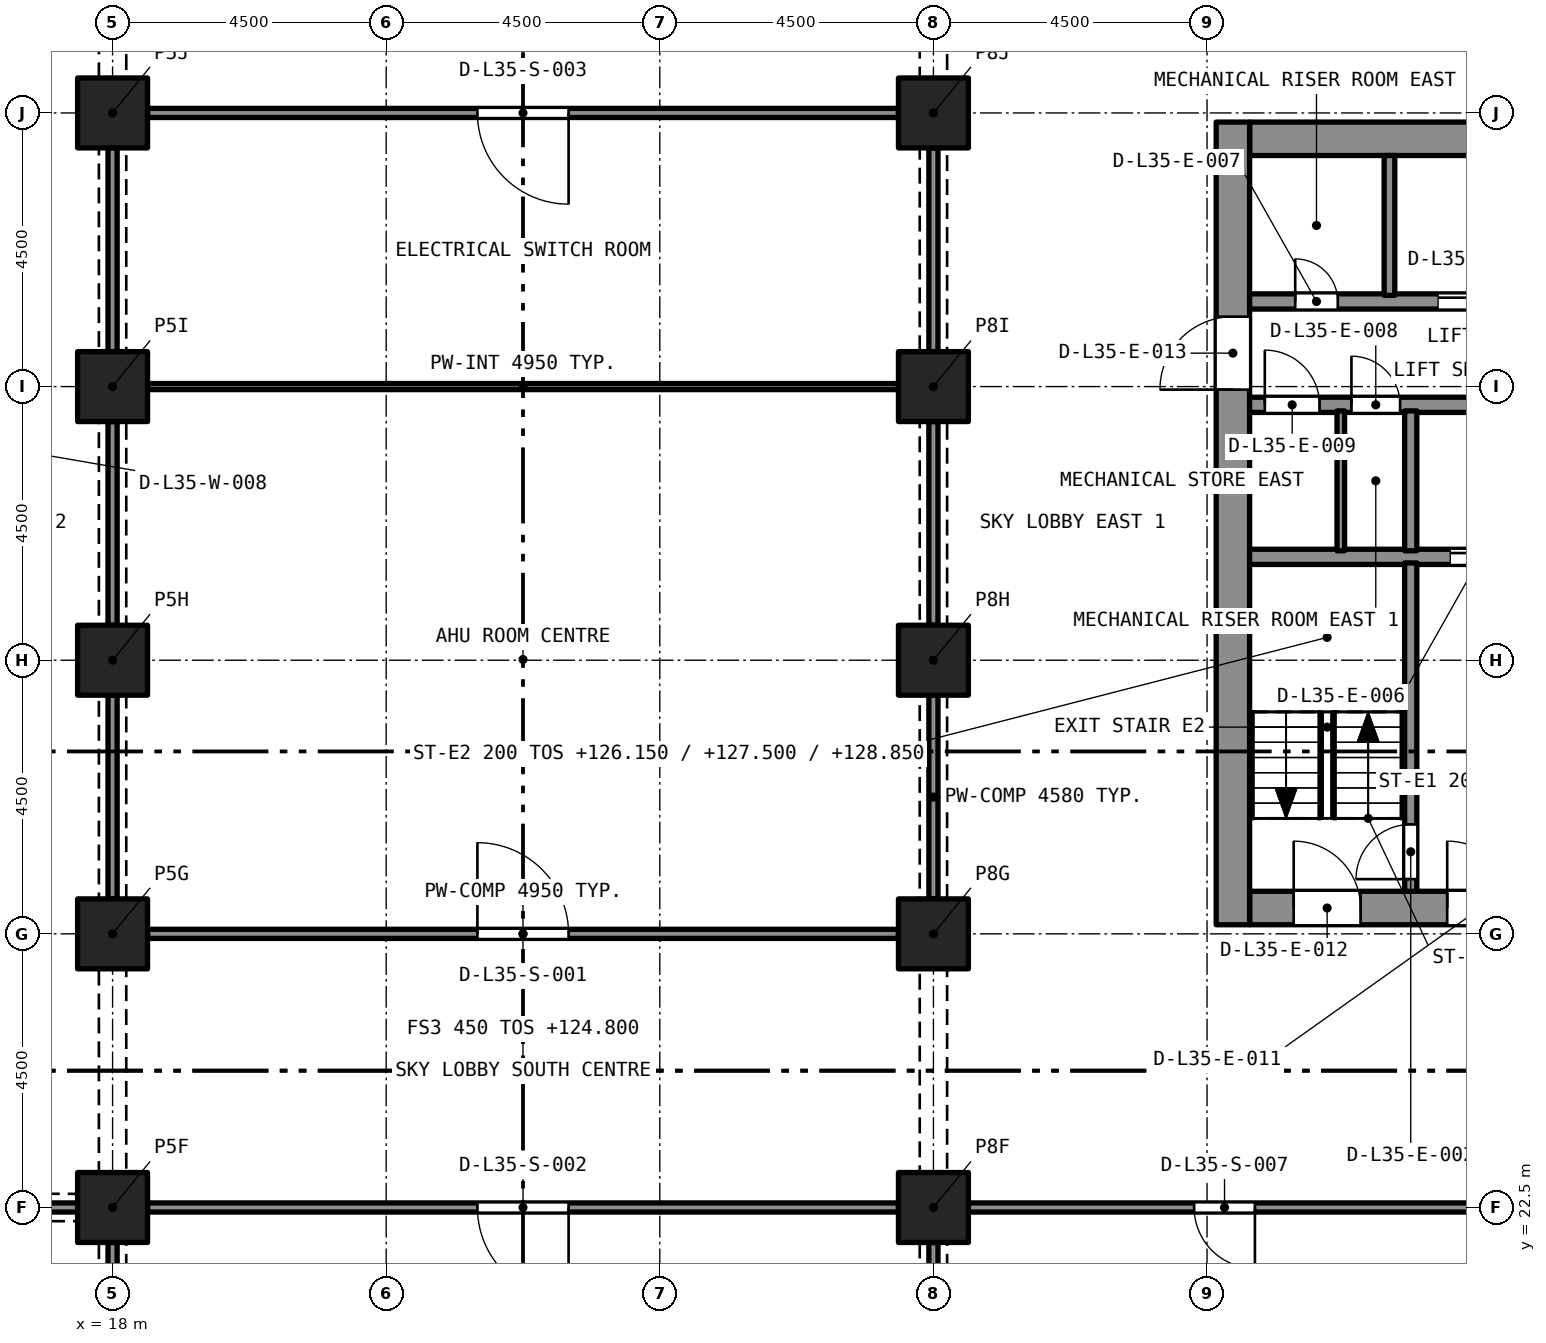
"""IFC4 building model, lengths in metres.
Left out: names, types, materials, properties, quantities, classifications, styles, units other than length and angle.
Written with IfcOpenShell. Run it as: python <this file> out.ifc"""

import sys

from ifc_helpers import new_model, si_unit, direction, frame, frame_2d, origin, origin_2d, place, context, subcontext, project, spatial, rectangle, extrude, element, fill, save


model = new_model("IFC4")
c1 = context("Model", 3, precision=1e-05, world=origin(), true_north=direction((0.0, 1.0)))
c2 = subcontext(c1, "Body", "Model", "MODEL_VIEW")
j1 = project(units=[si_unit("LENGTHUNIT", "METRE"), si_unit("PLANEANGLEUNIT", "RADIAN")], contexts=[c1])
p1 = place(None, origin())
s1 = spatial("IfcSite", under=j1, at=p1, CompositionType="ELEMENT")
p2 = place(p1, origin())
s2 = spatial("IfcBuilding", under=s1, at=p2, CompositionType="ELEMENT")
p3 = place(p2, frame((0.0, 0.0, 124.8)))
s3 = spatial("IfcBuildingStorey", under=s2, at=p3, CompositionType="ELEMENT", Elevation=124.8)
for number, where, z_axis, x_axis in (
    (1, (18.0, 22.5, 0.0), (0.0, 0.0, 1.0), (1.0, 0.0, 0.0)),
    (2, (31.5, 22.5, 0.0), (0.0, 0.0, 1.0), (1.0, 0.0, 0.0)),
    (3, (18.0, 27.0, 0.0), (0.0, 0.0, 1.0), (1.0, 0.0, 0.0)),
    (4, (31.5, 27.0, 0.0), (0.0, 0.0, 1.0), (1.0, 0.0, 0.0)),
    (5, (18.0, 31.5, 0.0), (0.0, 0.0, 1.0), (1.0, 0.0, 0.0)),
    (6, (31.5, 31.5, 0.0), (0.0, 0.0, 1.0), (1.0, 0.0, 0.0)),
    (7, (18.0, 36.0, 0.0), (0.0, 0.0, 1.0), (1.0, 0.0, 0.0)),
    (8, (31.5, 36.0, 0.0), (0.0, 0.0, 1.0), (1.0, 0.0, 0.0)),
    (9, (18.0, 40.5, 0.0), (0.0, 0.0, 1.0), (1.0, 0.0, 0.0)),
    (10, (31.5, 40.5, 0.0), (0.0, 0.0, 1.0), (1.0, 0.0, 0.0)),
):
    element("IfcColumn", number, at=place(p3, frame(where, z_axis=z_axis, x_axis=x_axis)), inside=s3, PredefinedType="COLUMN", context=c2, shape_type="SweptSolid", body=[
        extrude(rectangle(XDim=1.15, YDim=1.15, at=origin_2d()), origin(), (0.0, 0.0, 1.0), 5.4),
    ])
p4 = place(p3, frame((36.7, 27.425, 0.0), z_axis=(0.0, 0.0, 1.0), x_axis=(1.0, 0.0, 0.0)))
e11 = element("IfcWall", 11, at=p4, inside=s3, PredefinedType="SOLIDWALL", context=c2, shape_type="SweptSolid", body=[
    extrude(rectangle(XDim=7.6, YDim=0.55, at=frame_2d((3.8, 0.0))), origin(), (0.0, 0.0, 1.0), 5.4),
])
p5 = place(p4, frame((5.775, 0.0, 0.0)))
e12 = element("IfcOpeningElement", 12, at=p5, cuts=e11, PredefinedType="OPENING", context=c2, shape_type="SweptSolid", body=[
    extrude(rectangle(XDim=1.1, YDim=2.1, at=frame_2d((0.55, 1.05))), frame((0.0, 0.285, 0.0), z_axis=(0.0, -1.0, 0.0), x_axis=(1.0, 0.0, 0.0)), (0.0, 0.0, 1.0), 0.57),
])
p6 = place(p4, frame((3.25, 0.0, 0.0)))
e13 = element("IfcOpeningElement", 13, at=p6, cuts=e11, PredefinedType="OPENING", context=c2, shape_type="SweptSolid", body=[
    extrude(rectangle(XDim=1.1, YDim=2.1, at=frame_2d((0.55, 1.05))), frame((0.0, 0.285, 0.0), z_axis=(0.0, -1.0, 0.0), x_axis=(1.0, 0.0, 0.0)), (0.0, 0.0, 1.0), 0.57),
])
p7 = place(p4, frame((0.725, 0.0, 0.0)))
e14 = element("IfcOpeningElement", 14, at=p7, cuts=e11, PredefinedType="OPENING", context=c2, shape_type="SweptSolid", body=[
    extrude(rectangle(XDim=1.1, YDim=2.1, at=frame_2d((0.55, 1.05))), frame((0.0, 0.285, 0.0), z_axis=(0.0, -1.0, 0.0), x_axis=(1.0, 0.0, 0.0)), (0.0, 0.0, 1.0), 0.57),
])
p8 = place(p3, frame((36.7, 40.075, 0.0), z_axis=(0.0, 0.0, 1.0), x_axis=(1.0, 0.0, 0.0)))
e15 = element("IfcWall", 15, at=p8, inside=s3, PredefinedType="SOLIDWALL", context=c2, shape_type="SweptSolid", body=[
    extrude(rectangle(XDim=7.6, YDim=0.55, at=frame_2d((3.8, 0.0))), origin(), (0.0, 0.0, 1.0), 5.4),
])
p9 = place(p3, frame((36.425, 27.15, 0.0), z_axis=(0.0, 0.0, 1.0), x_axis=(0.0, 1.0, 0.0)))
e16 = element("IfcWall", 16, at=p9, inside=s3, PredefinedType="SOLIDWALL", context=c2, shape_type="SweptSolid", body=[
    extrude(rectangle(XDim=13.2, YDim=0.55, at=frame_2d((6.6, 0.0))), origin(), (0.0, 0.0, 1.0), 5.4),
])
p10 = place(p9, frame((8.8, 0.0, 0.0)))
e17 = element("IfcOpeningElement", 17, at=p10, cuts=e16, PredefinedType="OPENING", context=c2, shape_type="SweptSolid", body=[
    extrude(rectangle(XDim=1.2, YDim=2.1, at=frame_2d((0.6, 1.05))), frame((0.0, 0.285, 0.0), z_axis=(0.0, -1.0, 0.0), x_axis=(1.0, 0.0, 0.0)), (0.0, 0.0, 1.0), 0.57),
])
p11 = place(p3, frame((36.7, 33.2, 0.0), z_axis=(0.0, 0.0, 1.0), x_axis=(1.0, 0.0, 0.0)))
e18 = element("IfcWall", 18, at=p11, inside=s3, PredefinedType="SOLIDWALL", context=c2, shape_type="SweptSolid", body=[
    extrude(rectangle(XDim=7.6, YDim=0.25, at=frame_2d((3.8, 0.0))), origin(), (0.0, 0.0, 1.0), 5.1),
])
p12 = place(p11, frame((3.3, 0.0, 0.0)))
e19 = element("IfcOpeningElement", 19, at=p12, cuts=e18, PredefinedType="OPENING", context=c2, shape_type="SweptSolid", body=[
    extrude(rectangle(XDim=1.0, YDim=2.1, at=frame_2d((0.5, 1.05))), frame((0.0, 0.135, 0.0), z_axis=(0.0, -1.0, 0.0), x_axis=(1.0, 0.0, 0.0)), (0.0, 0.0, 1.0), 0.27),
])
p13 = place(p3, frame((36.7, 35.7, 0.0), z_axis=(0.0, 0.0, 1.0), x_axis=(1.0, 0.0, 0.0)))
e20 = element("IfcWall", 20, at=p13, inside=s3, PredefinedType="SOLIDWALL", context=c2, shape_type="SweptSolid", body=[
    extrude(rectangle(XDim=7.6, YDim=0.25, at=frame_2d((3.8, 0.0))), origin(), (0.0, 0.0, 1.0), 5.1),
])
p14 = place(p13, frame((5.775, 0.0, 0.0)))
e21 = element("IfcOpeningElement", 21, at=p14, cuts=e20, PredefinedType="OPENING", context=c2, shape_type="SweptSolid", body=[
    extrude(rectangle(XDim=1.1, YDim=2.4, at=frame_2d((0.55, 1.2))), frame((0.0, 0.135, 0.0), z_axis=(0.0, -1.0, 0.0), x_axis=(1.0, 0.0, 0.0)), (0.0, 0.0, 1.0), 0.27),
])
p15 = place(p13, frame((1.675, 0.0, 0.0)))
e22 = element("IfcOpeningElement", 22, at=p15, cuts=e20, PredefinedType="OPENING", context=c2, shape_type="SweptSolid", body=[
    extrude(rectangle(XDim=0.8, YDim=2.1, at=frame_2d((0.4, 1.05))), frame((0.0, 0.135, 0.0), z_axis=(0.0, -1.0, 0.0), x_axis=(1.0, 0.0, 0.0)), (0.0, 0.0, 1.0), 0.27),
])
p16 = place(p13, frame((0.25, 0.0, 0.0)))
e23 = element("IfcOpeningElement", 23, at=p16, cuts=e20, PredefinedType="OPENING", context=c2, shape_type="SweptSolid", body=[
    extrude(rectangle(XDim=0.9, YDim=2.1, at=frame_2d((0.45, 1.05))), frame((0.0, 0.135, 0.0), z_axis=(0.0, -1.0, 0.0), x_axis=(1.0, 0.0, 0.0)), (0.0, 0.0, 1.0), 0.27),
])
p17 = place(p3, frame((36.7, 37.4, 0.0), z_axis=(0.0, 0.0, 1.0), x_axis=(1.0, 0.0, 0.0)))
e24 = element("IfcWall", 24, at=p17, inside=s3, PredefinedType="SOLIDWALL", context=c2, shape_type="SweptSolid", body=[
    extrude(rectangle(XDim=7.6, YDim=0.25, at=frame_2d((3.8, 0.0))), origin(), (0.0, 0.0, 1.0), 5.1),
])
p18 = place(p17, frame((5.8, 0.0, 0.0)))
e25 = element("IfcOpeningElement", 25, at=p18, cuts=e24, PredefinedType="OPENING", context=c2, shape_type="SweptSolid", body=[
    extrude(rectangle(XDim=1.1, YDim=2.4, at=frame_2d((0.55, 1.2))), frame((0.0, 0.135, 0.0), z_axis=(0.0, -1.0, 0.0), x_axis=(1.0, 0.0, 0.0)), (0.0, 0.0, 1.0), 0.27),
])
p19 = place(p17, frame((3.1, 0.0, 0.0)))
e26 = element("IfcOpeningElement", 26, at=p19, cuts=e24, PredefinedType="OPENING", context=c2, shape_type="SweptSolid", body=[
    extrude(rectangle(XDim=1.1, YDim=2.4, at=frame_2d((0.55, 1.2))), frame((0.0, 0.135, 0.0), z_axis=(0.0, -1.0, 0.0), x_axis=(1.0, 0.0, 0.0)), (0.0, 0.0, 1.0), 0.27),
])
p20 = place(p17, frame((0.75, 0.0, 0.0)))
e27 = element("IfcOpeningElement", 27, at=p20, cuts=e24, PredefinedType="OPENING", context=c2, shape_type="SweptSolid", body=[
    extrude(rectangle(XDim=0.7, YDim=2.1, at=frame_2d((0.35, 1.05))), frame((0.0, 0.135, 0.0), z_axis=(0.0, -1.0, 0.0), x_axis=(1.0, 0.0, 0.0)), (0.0, 0.0, 1.0), 0.27),
])
p21 = place(p3, frame((39.35, 27.7, 0.0), z_axis=(0.0, 0.0, 1.0), x_axis=(0.0, 1.0, 0.0)))
e28 = element("IfcWall", 28, at=p21, inside=s3, PredefinedType="SOLIDWALL", context=c2, shape_type="SweptSolid", body=[
    extrude(rectangle(XDim=5.4, YDim=0.2, at=frame_2d((2.7, 0.0))), origin(), (0.0, 0.0, 1.0), 5.1),
])
p22 = place(p21, frame((0.2, 0.0, 0.0)))
e29 = element("IfcOpeningElement", 29, at=p22, cuts=e28, PredefinedType="OPENING", context=c2, shape_type="SweptSolid", body=[
    extrude(rectangle(XDim=0.9, YDim=2.1, at=frame_2d((0.45, 1.05))), frame((0.0, 0.11, 0.0), z_axis=(0.0, -1.0, 0.0), x_axis=(1.0, 0.0, 0.0)), (0.0, 0.0, 1.0), 0.22),
])
p23 = place(p3, frame((39.35, 33.3, 0.0), z_axis=(0.0, 0.0, 1.0), x_axis=(0.0, 1.0, 0.0)))
e30 = element("IfcWall", 30, at=p23, inside=s3, PredefinedType="SOLIDWALL", context=c2, shape_type="SweptSolid", body=[
    extrude(rectangle(XDim=2.3, YDim=0.2, at=frame_2d((1.15, 0.0))), origin(), (0.0, 0.0, 1.0), 5.1),
])
p24 = place(p3, frame((39.0, 37.5, 0.0), z_axis=(0.0, 0.0, 1.0), x_axis=(0.0, 1.0, 0.0)))
e31 = element("IfcWall", 31, at=p24, inside=s3, PredefinedType="SOLIDWALL", context=c2, shape_type="SweptSolid", body=[
    extrude(rectangle(XDim=2.3, YDim=0.175, at=frame_2d((1.15, 0.0))), origin(), (0.0, 0.0, 1.0), 5.1),
])
p25 = place(p3, frame((38.2, 33.3, 0.0), z_axis=(0.0, 0.0, 1.0), x_axis=(0.0, 1.0, 0.0)))
e32 = element("IfcWall", 32, at=p25, inside=s3, PredefinedType="PARTITIONING", context=c2, shape_type="SweptSolid", body=[
    extrude(rectangle(XDim=2.3, YDim=0.125, at=frame_2d((1.15, 0.0))), origin(), (0.0, 0.0, 1.0), 5.1),
])
p26 = place(p3, frame((18.575, 27.0, 0.0), z_axis=(0.0, 0.0, 1.0), x_axis=(1.0, 0.0, 0.0)))
e33 = element("IfcWall", 33, at=p26, inside=s3, PredefinedType="PARTITIONING", context=c2, shape_type="SweptSolid", body=[
    extrude(rectangle(XDim=12.35, YDim=0.15, at=frame_2d((6.175, 0.0))), origin(), (0.0, 0.0, 1.0), 4.95),
])
p27 = place(p26, frame((5.425, 0.0, 0.0)))
e34 = element("IfcOpeningElement", 34, at=p27, cuts=e33, PredefinedType="OPENING", context=c2, shape_type="SweptSolid", body=[
    extrude(rectangle(XDim=1.5, YDim=2.4, at=frame_2d((0.75, 1.2))), frame((0.0, 0.085, 0.0), z_axis=(0.0, -1.0, 0.0), x_axis=(1.0, 0.0, 0.0)), (0.0, 0.0, 1.0), 0.17),
])
p28 = place(p3, frame((30.925, 22.5, 0.0), z_axis=(0.0, 0.0, 1.0), x_axis=(-1.0, 0.0, 0.0)))
e35 = element("IfcWall", 35, at=p28, inside=s3, PredefinedType="PARTITIONING", context=c2, shape_type="SweptSolid", body=[
    extrude(rectangle(XDim=12.35, YDim=0.15, at=frame_2d((6.175, 0.0))), origin(), (0.0, 0.0, 1.0), 4.95),
])
p29 = place(p28, frame((5.425, 0.0, 0.0)))
e36 = element("IfcOpeningElement", 36, at=p29, cuts=e35, PredefinedType="OPENING", context=c2, shape_type="SweptSolid", body=[
    extrude(rectangle(XDim=1.5, YDim=2.4, at=frame_2d((0.75, 1.2))), frame((0.0, 0.085, 0.0), z_axis=(0.0, -1.0, 0.0), x_axis=(1.0, 0.0, 0.0)), (0.0, 0.0, 1.0), 0.17),
])
p30 = place(p3, frame((18.575, 36.0, 0.0), z_axis=(0.0, 0.0, 1.0), x_axis=(1.0, 0.0, 0.0)))
e37 = element("IfcWall", 37, at=p30, inside=s3, PredefinedType="PARTITIONING", context=c2, shape_type="SweptSolid", body=[
    extrude(rectangle(XDim=12.35, YDim=0.1, at=frame_2d((6.175, 0.0))), origin(), (0.0, 0.0, 1.0), 4.95),
])
for number, where, z_axis, x_axis in (
    (38, (31.5, 32.075, 0.0), (0.0, 0.0, 1.0), (0.0, 1.0, 0.0)),
    (39, (31.5, 27.575, 0.0), (0.0, 0.0, 1.0), (0.0, 1.0, 0.0)),
    (40, (18.0, 27.575, 0.0), (0.0, 0.0, 1.0), (0.0, 1.0, 0.0)),
    (41, (18.0, 32.075, 0.0), (0.0, 0.0, 1.0), (0.0, 1.0, 0.0)),
):
    element("IfcWall", number, at=place(p3, frame(where, z_axis=z_axis, x_axis=x_axis)), inside=s3, PredefinedType="PARTITIONING", context=c2, shape_type="SweptSolid", body=[
        extrude(rectangle(XDim=3.35, YDim=0.15, at=frame_2d((1.675, 0.0))), origin(), (0.0, 0.0, 1.0), 4.58),
    ])
p31 = place(p3, frame((30.925, 40.5, 0.0), z_axis=(0.0, 0.0, 1.0), x_axis=(-1.0, 0.0, 0.0)))
e42 = element("IfcWall", 42, at=p31, inside=s3, PredefinedType="PARTITIONING", context=c2, shape_type="SweptSolid", body=[
    extrude(rectangle(XDim=12.35, YDim=0.15, at=frame_2d((6.175, 0.0))), origin(), (0.0, 0.0, 1.0), 4.95),
])
p32 = place(p31, frame((5.425, 0.0, 0.0)))
e43 = element("IfcOpeningElement", 43, at=p32, cuts=e42, PredefinedType="OPENING", context=c2, shape_type="SweptSolid", body=[
    extrude(rectangle(XDim=1.5, YDim=2.4, at=frame_2d((0.75, 1.2))), frame((0.0, 0.085, 0.0), z_axis=(0.0, -1.0, 0.0), x_axis=(1.0, 0.0, 0.0)), (0.0, 0.0, 1.0), 0.17),
])
for number, where, z_axis, x_axis in (
    (44, (31.5, 36.575, 0.0), (0.0, 0.0, 1.0), (0.0, 1.0, 0.0)),
    (45, (18.0, 36.575, 0.0), (0.0, 0.0, 1.0), (0.0, 1.0, 0.0)),
    (46, (31.5, 18.575, 0.0), (0.0, 0.0, 1.0), (0.0, 1.0, 0.0)),
    (47, (18.0, 18.575, 0.0), (0.0, 0.0, 1.0), (0.0, 1.0, 0.0)),
):
    element("IfcWall", number, at=place(p3, frame(where, z_axis=z_axis, x_axis=x_axis)), inside=s3, PredefinedType="PARTITIONING", context=c2, shape_type="SweptSolid", body=[
        extrude(rectangle(XDim=3.35, YDim=0.15, at=frame_2d((1.675, 0.0))), origin(), (0.0, 0.0, 1.0), 4.58),
    ])
p33 = place(p3, frame((40.575, 22.5, 0.0), z_axis=(0.0, 0.0, 1.0), x_axis=(-1.0, 0.0, 0.0)))
e48 = element("IfcWall", 48, at=p33, inside=s3, PredefinedType="PARTITIONING", context=c2, shape_type="SweptSolid", body=[
    extrude(rectangle(XDim=8.5, YDim=0.15, at=frame_2d((4.25, 0.0))), origin(), (0.0, 0.0, 1.0), 5.1),
])
p34 = place(p33, frame((3.788, 0.0, 0.0)))
e49 = element("IfcOpeningElement", 49, at=p34, cuts=e48, PredefinedType="OPENING", context=c2, shape_type="SweptSolid", body=[
    extrude(rectangle(XDim=1.0, YDim=2.1, at=frame_2d((0.5, 1.05))), frame((0.0, 0.085, 0.0), z_axis=(0.0, -1.0, 0.0), x_axis=(1.0, 0.0, 0.0)), (0.0, 0.0, 1.0), 0.17),
])
p35 = place(p3, frame((17.425, 22.5, 0.0), z_axis=(0.0, 0.0, 1.0), x_axis=(-1.0, 0.0, 0.0)))
e50 = element("IfcWall", 50, at=p35, inside=s3, PredefinedType="PARTITIONING", context=c2, shape_type="SweptSolid", body=[
    extrude(rectangle(XDim=3.35, YDim=0.15, at=frame_2d((1.675, 0.0))), origin(), (0.0, 0.0, 1.0), 4.58),
])
p36 = place(p35, frame((1.175, 0.0, 0.0)))
e51 = element("IfcOpeningElement", 51, at=p36, cuts=e50, PredefinedType="OPENING", context=c2, shape_type="SweptSolid", body=[
    extrude(rectangle(XDim=1.0, YDim=2.1, at=frame_2d((0.5, 1.05))), frame((0.0, 0.085, 0.0), z_axis=(0.0, -1.0, 0.0), x_axis=(1.0, 0.0, 0.0)), (0.0, 0.0, 1.0), 0.17),
])
p37 = place(p22, origin())
e52 = element("IfcDoor", 52, at=p37, inside=s3, OperationType="SINGLE_SWING_LEFT", PredefinedType="DOOR", context=c2, shape_type="SweptSolid", body=[
    extrude(rectangle(XDim=0.9, YDim=2.1, at=frame_2d((0.45, 1.05))), frame((0.0, 0.025, 0.0), z_axis=(0.0, -1.0, 0.0), x_axis=(1.0, 0.0, 0.0)), (0.0, 0.0, 1.0), 0.05),
])
fill(e29, e52)
p38 = place(p19, origin())
e53 = element("IfcDoor", 53, at=p38, inside=s3, OperationType="SLIDING_TO_LEFT", PredefinedType="DOOR", context=c2, shape_type="SweptSolid", body=[
    extrude(rectangle(XDim=1.1, YDim=2.4, at=frame_2d((0.55, 1.2))), frame((0.0, 0.025, 0.0), z_axis=(0.0, -1.0, 0.0), x_axis=(1.0, 0.0, 0.0)), (0.0, 0.0, 1.0), 0.05),
])
fill(e26, e53)
p39 = place(p12, origin())
e54 = element("IfcDoor", 54, at=p39, inside=s3, OperationType="SLIDING_TO_LEFT", PredefinedType="DOOR", context=c2, shape_type="SweptSolid", body=[
    extrude(rectangle(XDim=1.0, YDim=2.1, at=frame_2d((0.5, 1.05))), frame((0.0, 0.025, 0.0), z_axis=(0.0, -1.0, 0.0), x_axis=(1.0, 0.0, 0.0)), (0.0, 0.0, 1.0), 0.05),
])
fill(e19, e54)
p40 = place(p20, origin())
e55 = element("IfcDoor", 55, at=p40, inside=s3, OperationType="SINGLE_SWING_LEFT", PredefinedType="DOOR", context=c2, shape_type="SweptSolid", body=[
    extrude(rectangle(XDim=0.7, YDim=2.1, at=frame_2d((0.35, 1.05))), frame((0.0, 0.025, 0.0), z_axis=(0.0, -1.0, 0.0), x_axis=(1.0, 0.0, 0.0)), (0.0, 0.0, 1.0), 0.05),
])
fill(e27, e55)
p41 = place(p15, origin())
e56 = element("IfcDoor", 56, at=p41, inside=s3, OperationType="SINGLE_SWING_LEFT", PredefinedType="DOOR", context=c2, shape_type="SweptSolid", body=[
    extrude(rectangle(XDim=0.8, YDim=2.1, at=frame_2d((0.4, 1.05))), frame((0.0, 0.025, 0.0), z_axis=(0.0, -1.0, 0.0), x_axis=(1.0, 0.0, 0.0)), (0.0, 0.0, 1.0), 0.05),
])
fill(e22, e56)
p42 = place(p16, origin())
e57 = element("IfcDoor", 57, at=p42, inside=s3, OperationType="SINGLE_SWING_LEFT", PredefinedType="DOOR", context=c2, shape_type="SweptSolid", body=[
    extrude(rectangle(XDim=0.9, YDim=2.1, at=frame_2d((0.45, 1.05))), frame((0.0, 0.025, 0.0), z_axis=(0.0, -1.0, 0.0), x_axis=(1.0, 0.0, 0.0)), (0.0, 0.0, 1.0), 0.05),
])
fill(e23, e57)
p43 = place(p6, origin())
e58 = element("IfcDoor", 58, at=p43, inside=s3, OperationType="SINGLE_SWING_LEFT", PredefinedType="DOOR", context=c2, shape_type="SweptSolid", body=[
    extrude(rectangle(XDim=1.1, YDim=2.1, at=frame_2d((0.55, 1.05))), frame((0.0, 0.025, 0.0), z_axis=(0.0, -1.0, 0.0), x_axis=(1.0, 0.0, 0.0)), (0.0, 0.0, 1.0), 0.05),
])
fill(e13, e58)
p44 = place(p7, origin())
e59 = element("IfcDoor", 59, at=p44, inside=s3, OperationType="SINGLE_SWING_LEFT", PredefinedType="DOOR", context=c2, shape_type="SweptSolid", body=[
    extrude(rectangle(XDim=1.1, YDim=2.1, at=frame_2d((0.55, 1.05))), frame((0.0, 0.025, 0.0), z_axis=(0.0, -1.0, 0.0), x_axis=(1.0, 0.0, 0.0)), (0.0, 0.0, 1.0), 0.05),
])
fill(e14, e59)
p45 = place(p10, origin())
e60 = element("IfcDoor", 60, at=p45, inside=s3, OperationType="SINGLE_SWING_LEFT", PredefinedType="DOOR", context=c2, shape_type="SweptSolid", body=[
    extrude(rectangle(XDim=1.2, YDim=2.1, at=frame_2d((0.6, 1.05))), frame((0.0, 0.025, 0.0), z_axis=(0.0, -1.0, 0.0), x_axis=(1.0, 0.0, 0.0)), (0.0, 0.0, 1.0), 0.05),
])
fill(e17, e60)
p46 = place(p27, origin())
e61 = element("IfcDoor", 61, at=p46, inside=s3, OperationType="DOUBLE_DOOR_SINGLE_SWING", PredefinedType="DOOR", context=c2, shape_type="SweptSolid", body=[
    extrude(rectangle(XDim=1.5, YDim=2.4, at=frame_2d((0.75, 1.2))), frame((0.0, 0.025, 0.0), z_axis=(0.0, -1.0, 0.0), x_axis=(1.0, 0.0, 0.0)), (0.0, 0.0, 1.0), 0.05),
])
fill(e34, e61)
p47 = place(p29, origin())
e62 = element("IfcDoor", 62, at=p47, inside=s3, OperationType="DOUBLE_DOOR_SINGLE_SWING", PredefinedType="DOOR", context=c2, shape_type="SweptSolid", body=[
    extrude(rectangle(XDim=1.5, YDim=2.4, at=frame_2d((0.75, 1.2))), frame((0.0, 0.025, 0.0), z_axis=(0.0, -1.0, 0.0), x_axis=(1.0, 0.0, 0.0)), (0.0, 0.0, 1.0), 0.05),
])
fill(e36, e62)
p48 = place(p32, origin())
e63 = element("IfcDoor", 63, at=p48, inside=s3, OperationType="DOUBLE_DOOR_SINGLE_SWING", PredefinedType="DOOR", context=c2, shape_type="SweptSolid", body=[
    extrude(rectangle(XDim=1.5, YDim=2.4, at=frame_2d((0.75, 1.2))), frame((0.0, 0.025, 0.0), z_axis=(0.0, -1.0, 0.0), x_axis=(1.0, 0.0, 0.0)), (0.0, 0.0, 1.0), 0.05),
])
fill(e43, e63)
p49 = place(p34, origin())
e64 = element("IfcDoor", 64, at=p49, inside=s3, OperationType="SINGLE_SWING_RIGHT", PredefinedType="DOOR", context=c2, shape_type="SweptSolid", body=[
    extrude(rectangle(XDim=1.0, YDim=2.1, at=frame_2d((0.5, 1.05))), frame((0.0, 0.025, 0.0), z_axis=(0.0, -1.0, 0.0), x_axis=(1.0, 0.0, 0.0)), (0.0, 0.0, 1.0), 0.05),
])
fill(e49, e64)
save(model, sys.argv[1])
